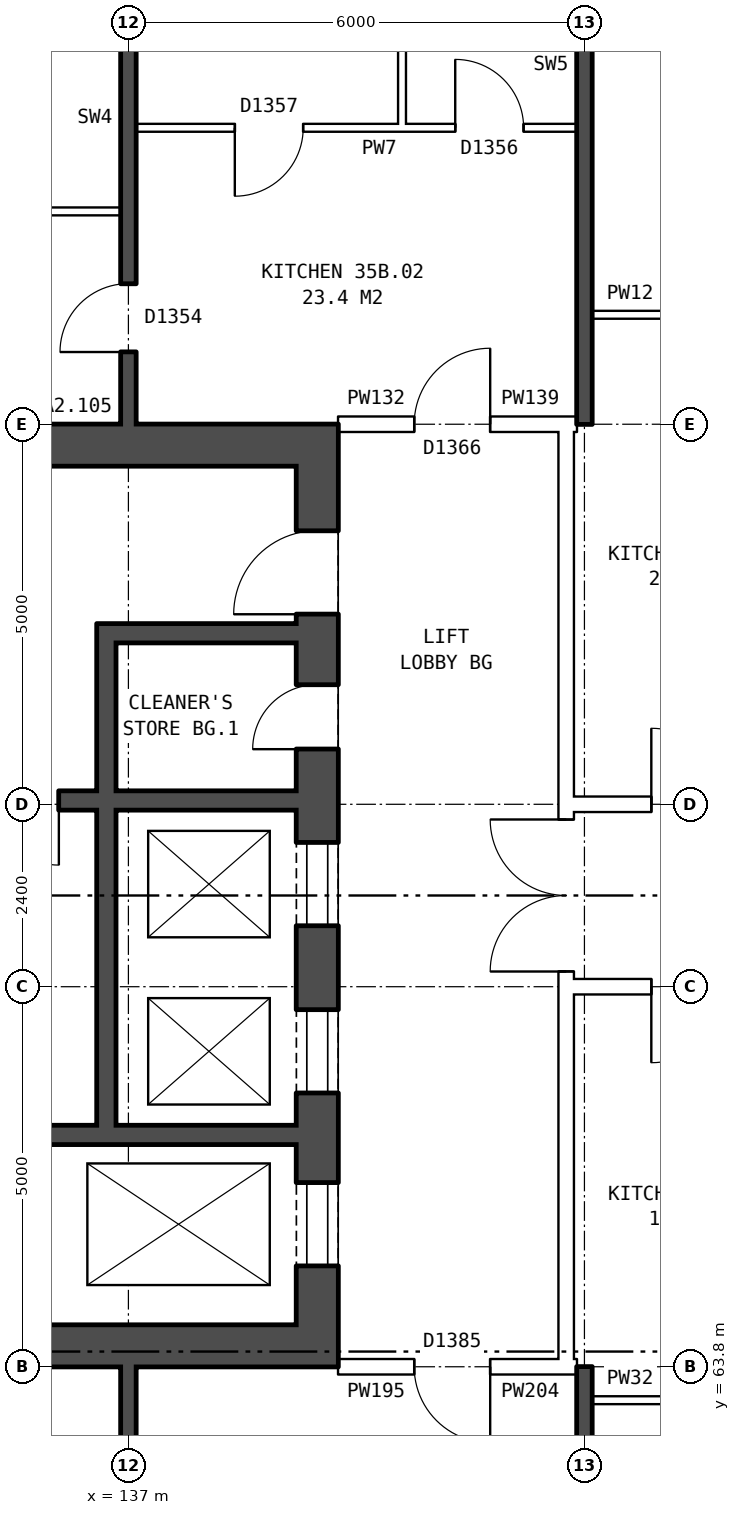
"""IFC4 building model, lengths in metres.
Left out: names, types, materials, properties, quantities, classifications, styles, units other than length and angle.
Written with IfcOpenShell. Run it as: python <this file> out.ifc"""

import sys

from ifc_helpers import new_model, si_unit, direction, frame, frame_2d, origin, place, context, subcontext, project, spatial, rectangle, extrude, element, fill, save


model = new_model("IFC4")
c1 = context("Model", 3, precision=1e-05, world=origin(), true_north=direction((0.0, 1.0)))
c2 = subcontext(c1, "Body", "Model", "MODEL_VIEW")
j1 = project(units=[si_unit("LENGTHUNIT", "METRE"), si_unit("PLANEANGLEUNIT", "RADIAN")], contexts=[c1])
p1 = place(None, origin())
s1 = spatial("IfcSite", under=j1, at=p1, CompositionType="ELEMENT")
p2 = place(p1, origin())
s2 = spatial("IfcBuilding", under=s1, at=p2, CompositionType="ELEMENT")
p3 = place(p2, frame((0.0, 0.0, 126.8)))
s3 = spatial("IfcBuildingStorey", under=s2, at=p3, CompositionType="ELEMENT", Elevation=126.8)
p4 = place(p3, frame((139.485, 63.8, 0.0), z_axis=(0.0, 0.0, 1.0), x_axis=(0.0, 1.0, 0.0)))
e1 = element("IfcWall", 1, at=p4, inside=s3, PredefinedType="SHEAR", context=c2, shape_type="SweptSolid", body=[
    extrude(rectangle(XDim=12.4, YDim=0.55, at=frame_2d((6.2, 0.0))), origin(), (0.0, 0.0, 1.0), 2.85),
])
p5 = place(p4, frame((1.325, 0.0, 0.0)))
e2 = element("IfcOpeningElement", 2, at=p5, cuts=e1, PredefinedType="OPENING", context=c2, shape_type="SweptSolid", body=[
    extrude(rectangle(XDim=1.1, YDim=2.1, at=frame_2d((0.55, 1.05))), frame((0.0, 0.285, 0.0), z_axis=(0.0, -1.0, 0.0), x_axis=(1.0, 0.0, 0.0)), (0.0, 0.0, 1.0), 0.57),
])
p6 = place(p4, frame((3.6, 0.0, 0.0)))
e3 = element("IfcOpeningElement", 3, at=p6, cuts=e1, PredefinedType="OPENING", context=c2, shape_type="SweptSolid", body=[
    extrude(rectangle(XDim=1.1, YDim=2.1, at=frame_2d((0.55, 1.05))), frame((0.0, 0.285, 0.0), z_axis=(0.0, -1.0, 0.0), x_axis=(1.0, 0.0, 0.0)), (0.0, 0.0, 1.0), 0.57),
])
p7 = place(p4, frame((5.8, 0.0, 0.0)))
e4 = element("IfcOpeningElement", 4, at=p7, cuts=e1, PredefinedType="OPENING", context=c2, shape_type="SweptSolid", body=[
    extrude(rectangle(XDim=1.1, YDim=2.1, at=frame_2d((0.55, 1.05))), frame((0.0, 0.285, 0.0), z_axis=(0.0, -1.0, 0.0), x_axis=(1.0, 0.0, 0.0)), (0.0, 0.0, 1.0), 0.57),
])
p8 = place(p4, frame((9.9, 0.0, 0.0)))
e5 = element("IfcOpeningElement", 5, at=p8, cuts=e1, PredefinedType="OPENING", context=c2, shape_type="SweptSolid", body=[
    extrude(rectangle(XDim=1.1, YDim=2.1, at=frame_2d((0.55, 1.05))), frame((0.0, 0.285, 0.0), z_axis=(0.0, -1.0, 0.0), x_axis=(1.0, 0.0, 0.0)), (0.0, 0.0, 1.0), 0.57),
])
p9 = place(p4, frame((8.125, 0.0, 0.0)))
e6 = element("IfcOpeningElement", 6, at=p9, cuts=e1, PredefinedType="OPENING", context=c2, shape_type="SweptSolid", body=[
    extrude(rectangle(XDim=0.85, YDim=2.1, at=frame_2d((0.425, 1.05))), frame((0.0, 0.285, 0.0), z_axis=(0.0, -1.0, 0.0), x_axis=(1.0, 0.0, 0.0)), (0.0, 0.0, 1.0), 0.57),
])
for number, where, z_axis, x_axis in (
    (7, (139.21, 64.075, 0.0), (0.0, 0.0, 1.0), (-1.0, 0.0, 0.0)),
    (8, (139.21, 75.925, 0.0), (0.0, 0.0, 1.0), (-1.0, 0.0, 0.0)),
):
    element("IfcWall", number, at=place(p3, frame(where, z_axis=z_axis, x_axis=x_axis)), inside=s3, PredefinedType="SHEAR", context=c2, shape_type="SweptSolid", body=[
        extrude(rectangle(XDim=7.3, YDim=0.55, at=frame_2d((3.65, 0.0))), origin(), (0.0, 0.0, 1.0), 2.85),
    ])
p10 = place(p3, frame((139.21, 66.85, 0.0), z_axis=(0.0, 0.0, 1.0), x_axis=(-1.0, 0.0, 0.0)))
e9 = element("IfcWall", 9, at=p10, inside=s3, PredefinedType="SHEAR", context=c2, shape_type="SweptSolid", body=[
    extrude(rectangle(XDim=4.475, YDim=0.25, at=frame_2d((2.237, 0.0))), origin(), (0.0, 0.0, 1.0), 2.85),
])
p11 = place(p3, frame((139.21, 71.25, 0.0), z_axis=(0.0, 0.0, 1.0), x_axis=(-1.0, 0.0, 0.0)))
e10 = element("IfcWall", 10, at=p11, inside=s3, PredefinedType="SHEAR", context=c2, shape_type="SweptSolid", body=[
    extrude(rectangle(XDim=7.3, YDim=0.25, at=frame_2d((3.65, 0.0))), origin(), (0.0, 0.0, 1.0), 2.85),
])
p12 = place(p11, frame((4.875, 0.0, 0.0)))
e11 = element("IfcOpeningElement", 11, at=p12, cuts=e10, PredefinedType="OPENING", context=c2, shape_type="SweptSolid", body=[
    extrude(rectangle(XDim=1.1, YDim=2.1, at=frame_2d((0.55, 1.05))), frame((0.0, 0.135, 0.0), z_axis=(0.0, -1.0, 0.0), x_axis=(1.0, 0.0, 0.0)), (0.0, 0.0, 1.0), 0.27),
])
p13 = place(p11, frame((3.125, 0.0, 0.0)))
e12 = element("IfcOpeningElement", 12, at=p13, cuts=e10, PredefinedType="OPENING", context=c2, shape_type="SweptSolid", body=[
    extrude(rectangle(XDim=0.85, YDim=2.1, at=frame_2d((0.425, 1.05))), frame((0.0, 0.135, 0.0), z_axis=(0.0, -1.0, 0.0), x_axis=(1.0, 0.0, 0.0)), (0.0, 0.0, 1.0), 0.27),
])
p14 = place(p3, frame((139.21, 73.45, 0.0), z_axis=(0.0, 0.0, 1.0), x_axis=(-1.0, 0.0, 0.0)))
e13 = element("IfcWall", 13, at=p14, inside=s3, PredefinedType="SHEAR", context=c2, shape_type="SweptSolid", body=[
    extrude(rectangle(XDim=2.375, YDim=0.25, at=frame_2d((1.188, 0.0))), origin(), (0.0, 0.0, 1.0), 2.85),
])
p15 = place(p3, frame((136.71, 66.975, 0.0), z_axis=(0.0, 0.0, 1.0), x_axis=(0.0, 1.0, 0.0)))
e14 = element("IfcWall", 14, at=p15, inside=s3, PredefinedType="SHEAR", context=c2, shape_type="SweptSolid", body=[
    extrude(rectangle(XDim=4.15, YDim=0.25, at=frame_2d((2.075, 0.0))), origin(), (0.0, 0.0, 1.0), 2.85),
])
p16 = place(p3, frame((136.71, 71.375, 0.0), z_axis=(0.0, 0.0, 1.0), x_axis=(0.0, 1.0, 0.0)))
e15 = element("IfcWall", 15, at=p16, inside=s3, PredefinedType="SHEAR", context=c2, shape_type="SweptSolid", body=[
    extrude(rectangle(XDim=2.2, YDim=0.25, at=frame_2d((1.1, 0.0))), origin(), (0.0, 0.0, 1.0), 2.85),
])
p17 = place(p3, frame((142.76, 63.9, 0.0), z_axis=(0.0, 0.0, 1.0), x_axis=(0.0, 1.0, 0.0)))
e16 = element("IfcWall", 16, at=p17, inside=s3, PredefinedType="PARTITIONING", context=c2, shape_type="SweptSolid", body=[
    extrude(rectangle(XDim=12.2, YDim=0.2, at=frame_2d((6.1, 0.0))), origin(), (0.0, 0.0, 1.0), 2.85),
])
p18 = place(p17, frame((5.1, 0.0, 0.0)))
e17 = element("IfcOpeningElement", 17, at=p18, cuts=e16, PredefinedType="OPENING", context=c2, shape_type="SweptSolid", body=[
    extrude(rectangle(XDim=2.0, YDim=2.1, at=frame_2d((1.0, 1.05))), frame((0.0, 0.11, 0.0), z_axis=(0.0, -1.0, 0.0), x_axis=(1.0, 0.0, 0.0)), (0.0, 0.0, 1.0), 0.22),
])
p19 = place(p3, frame((143.1, 63.36, 0.0), z_axis=(0.0, 0.0, 1.0), x_axis=(1.0, 0.0, 0.0)))
e18 = element("IfcWall", 18, at=p19, inside=s3, PredefinedType="PARTITIONING", context=c2, shape_type="SweptSolid", body=[
    extrude(rectangle(XDim=2.9, YDim=0.1, at=frame_2d((1.45, 0.0))), origin(), (0.0, 0.0, 1.0), 2.85),
])
p20 = place(p19, frame((1.0, 0.0, 0.0)))
e19 = element("IfcOpeningElement", 19, at=p20, cuts=e18, PredefinedType="OPENING", context=c2, shape_type="SweptSolid", body=[
    extrude(rectangle(XDim=0.9, YDim=2.1, at=frame_2d((0.45, 1.05))), frame((0.0, 0.06, 0.0), z_axis=(0.0, -1.0, 0.0), x_axis=(1.0, 0.0, 0.0)), (0.0, 0.0, 1.0), 0.12),
])
p21 = place(p3, frame((139.76, 63.8, 0.0), z_axis=(0.0, 0.0, 1.0), x_axis=(1.0, 0.0, 0.0)))
e20 = element("IfcWall", 20, at=p21, inside=s3, PredefinedType="PARTITIONING", context=c2, shape_type="SweptSolid", body=[
    extrude(rectangle(XDim=3.0, YDim=0.2, at=frame_2d((1.5, 0.0))), origin(), (0.0, 0.0, 1.0), 2.85),
])
p22 = place(p21, frame((1.0, 0.0, 0.0)))
e21 = element("IfcOpeningElement", 21, at=p22, cuts=e20, PredefinedType="OPENING", context=c2, shape_type="SweptSolid", body=[
    extrude(rectangle(XDim=1.0, YDim=2.1, at=frame_2d((0.5, 1.05))), frame((0.0, 0.11, 0.0), z_axis=(0.0, -1.0, 0.0), x_axis=(1.0, 0.0, 0.0)), (0.0, 0.0, 1.0), 0.22),
])
p23 = place(p3, frame((142.76, 63.8, 0.0), z_axis=(0.0, 0.0, 1.0), x_axis=(1.0, 0.0, 0.0)))
e22 = element("IfcWall", 22, at=p23, inside=s3, PredefinedType="PARTITIONING", context=c2, shape_type="SweptSolid", body=[
    extrude(rectangle(XDim=0.14, YDim=0.2, at=frame_2d((0.07, 0.0))), origin(), (0.0, 0.0, 1.0), 2.85),
])
p24 = place(p3, frame((142.76, 68.8, 0.0), z_axis=(0.0, 0.0, 1.0), x_axis=(1.0, 0.0, 0.0)))
e23 = element("IfcWall", 23, at=p24, inside=s3, PredefinedType="PARTITIONING", context=c2, shape_type="SweptSolid", body=[
    extrude(rectangle(XDim=14.48, YDim=0.2, at=frame_2d((7.24, 0.0))), origin(), (0.0, 0.0, 1.0), 2.85),
])
p25 = place(p24, frame((1.12, 0.0, 0.0)))
e24 = element("IfcOpeningElement", 24, at=p25, cuts=e23, PredefinedType="OPENING", context=c2, shape_type="SweptSolid", body=[
    extrude(rectangle(XDim=1.0, YDim=2.1, at=frame_2d((0.5, 1.05))), frame((0.0, 0.11, 0.0), z_axis=(0.0, -1.0, 0.0), x_axis=(1.0, 0.0, 0.0)), (0.0, 0.0, 1.0), 0.22),
])
p26 = place(p24, frame((7.24, 0.0, 0.0)))
e25 = element("IfcOpeningElement", 25, at=p26, cuts=e23, PredefinedType="OPENING", context=c2, shape_type="SweptSolid", body=[
    extrude(rectangle(XDim=1.0, YDim=2.1, at=frame_2d((0.5, 1.05))), frame((0.0, 0.11, 0.0), z_axis=(0.0, -1.0, 0.0), x_axis=(1.0, 0.0, 0.0)), (0.0, 0.0, 1.0), 0.22),
])
p27 = place(p3, frame((142.76, 71.2, 0.0), z_axis=(0.0, 0.0, 1.0), x_axis=(1.0, 0.0, 0.0)))
e26 = element("IfcWall", 26, at=p27, inside=s3, PredefinedType="PARTITIONING", context=c2, shape_type="SweptSolid", body=[
    extrude(rectangle(XDim=14.48, YDim=0.2, at=frame_2d((7.24, 0.0))), origin(), (0.0, 0.0, 1.0), 2.85),
])
p28 = place(p27, frame((1.12, 0.0, 0.0)))
e27 = element("IfcOpeningElement", 27, at=p28, cuts=e26, PredefinedType="OPENING", context=c2, shape_type="SweptSolid", body=[
    extrude(rectangle(XDim=1.0, YDim=2.1, at=frame_2d((0.5, 1.05))), frame((0.0, 0.11, 0.0), z_axis=(0.0, -1.0, 0.0), x_axis=(1.0, 0.0, 0.0)), (0.0, 0.0, 1.0), 0.22),
])
p29 = place(p27, frame((10.24, 0.0, 0.0)))
e28 = element("IfcOpeningElement", 28, at=p29, cuts=e26, PredefinedType="OPENING", context=c2, shape_type="SweptSolid", body=[
    extrude(rectangle(XDim=1.0, YDim=2.1, at=frame_2d((0.5, 1.05))), frame((0.0, 0.11, 0.0), z_axis=(0.0, -1.0, 0.0), x_axis=(1.0, 0.0, 0.0)), (0.0, 0.0, 1.0), 0.22),
])
p30 = place(p3, frame((139.76, 76.2, 0.0), z_axis=(0.0, 0.0, 1.0), x_axis=(1.0, 0.0, 0.0)))
e29 = element("IfcWall", 29, at=p30, inside=s3, PredefinedType="PARTITIONING", context=c2, shape_type="SweptSolid", body=[
    extrude(rectangle(XDim=3.0, YDim=0.2, at=frame_2d((1.5, 0.0))), origin(), (0.0, 0.0, 1.0), 2.85),
])
p31 = place(p30, frame((1.0, 0.0, 0.0)))
e30 = element("IfcOpeningElement", 30, at=p31, cuts=e29, PredefinedType="OPENING", context=c2, shape_type="SweptSolid", body=[
    extrude(rectangle(XDim=1.0, YDim=2.1, at=frame_2d((0.5, 1.05))), frame((0.0, 0.11, 0.0), z_axis=(0.0, -1.0, 0.0), x_axis=(1.0, 0.0, 0.0)), (0.0, 0.0, 1.0), 0.22),
])
p32 = place(p3, frame((142.76, 76.2, 0.0), z_axis=(0.0, 0.0, 1.0), x_axis=(1.0, 0.0, 0.0)))
e31 = element("IfcWall", 31, at=p32, inside=s3, PredefinedType="PARTITIONING", context=c2, shape_type="SweptSolid", body=[
    extrude(rectangle(XDim=0.14, YDim=0.2, at=frame_2d((0.07, 0.0))), origin(), (0.0, 0.0, 1.0), 2.85),
])
p33 = place(p3, frame((143.1, 77.64, 0.0), z_axis=(0.0, 0.0, 1.0), x_axis=(1.0, 0.0, 0.0)))
e32 = element("IfcWall", 32, at=p33, inside=s3, PredefinedType="PARTITIONING", context=c2, shape_type="SweptSolid", body=[
    extrude(rectangle(XDim=2.9, YDim=0.1, at=frame_2d((1.45, 0.0))), origin(), (0.0, 0.0, 1.0), 2.85),
])
p34 = place(p33, frame((1.0, 0.0, 0.0)))
e33 = element("IfcOpeningElement", 33, at=p34, cuts=e32, PredefinedType="OPENING", context=c2, shape_type="SweptSolid", body=[
    extrude(rectangle(XDim=0.9, YDim=2.1, at=frame_2d((0.45, 1.05))), frame((0.0, 0.06, 0.0), z_axis=(0.0, -1.0, 0.0), x_axis=(1.0, 0.0, 0.0)), (0.0, 0.0, 1.0), 0.12),
])
p35 = place(p3, frame((131.36, 79.0, 0.0), z_axis=(0.0, 0.0, 1.0), x_axis=(1.0, 0.0, 0.0)))
e34 = element("IfcWall", 34, at=p35, inside=s3, PredefinedType="PARTITIONING", context=c2, shape_type="SweptSolid", body=[
    extrude(rectangle(XDim=5.54, YDim=0.1, at=frame_2d((2.77, 0.0))), origin(), (0.0, 0.0, 1.0), 2.85),
])
p36 = place(p3, frame((137.1, 80.1, 0.0), z_axis=(0.0, 0.0, 1.0), x_axis=(1.0, 0.0, 0.0)))
e35 = element("IfcWall", 35, at=p36, inside=s3, PredefinedType="PARTITIONING", context=c2, shape_type="SweptSolid", body=[
    extrude(rectangle(XDim=5.8, YDim=0.1, at=frame_2d((2.9, 0.0))), origin(), (0.0, 0.0, 1.0), 2.85),
])
p37 = place(p36, frame((1.3, 0.0, 0.0)))
e36 = element("IfcOpeningElement", 36, at=p37, cuts=e35, PredefinedType="OPENING", context=c2, shape_type="SweptSolid", body=[
    extrude(rectangle(XDim=0.9, YDim=2.1, at=frame_2d((0.45, 1.05))), frame((0.0, 0.06, 0.0), z_axis=(0.0, -1.0, 0.0), x_axis=(1.0, 0.0, 0.0)), (0.0, 0.0, 1.0), 0.12),
])
p38 = place(p36, frame((4.2, 0.0, 0.0)))
e37 = element("IfcOpeningElement", 37, at=p38, cuts=e35, PredefinedType="OPENING", context=c2, shape_type="SweptSolid", body=[
    extrude(rectangle(XDim=0.9, YDim=2.1, at=frame_2d((0.45, 1.05))), frame((0.0, 0.06, 0.0), z_axis=(0.0, -1.0, 0.0), x_axis=(1.0, 0.0, 0.0)), (0.0, 0.0, 1.0), 0.12),
])
p39 = place(p3, frame((137.0, 54.36, 0.0), z_axis=(0.0, 0.0, 1.0), x_axis=(0.0, 1.0, 0.0)))
e38 = element("IfcWall", 38, at=p39, inside=s3, PredefinedType="SOLIDWALL", context=c2, shape_type="SweptSolid", body=[
    extrude(rectangle(XDim=9.44, YDim=0.2, at=frame_2d((4.72, 0.0))), origin(), (0.0, 0.0, 1.0), 2.85),
])
p40 = place(p39, frame((2.32, 0.0, 0.0)))
e39 = element("IfcOpeningElement", 39, at=p40, cuts=e38, PredefinedType="OPENING", context=c2, shape_type="SweptSolid", body=[
    extrude(rectangle(XDim=0.9, YDim=2.1, at=frame_2d((0.45, 1.05))), frame((0.0, 0.11, 0.0), z_axis=(0.0, -1.0, 0.0), x_axis=(1.0, 0.0, 0.0)), (0.0, 0.0, 1.0), 0.22),
])
p41 = place(p39, frame((7.59, 0.0, 0.0)))
e40 = element("IfcOpeningElement", 40, at=p41, cuts=e38, PredefinedType="OPENING", context=c2, shape_type="SweptSolid", body=[
    extrude(rectangle(XDim=0.9, YDim=2.1, at=frame_2d((0.45, 1.05))), frame((0.0, 0.11, 0.0), z_axis=(0.0, -1.0, 0.0), x_axis=(1.0, 0.0, 0.0)), (0.0, 0.0, 1.0), 0.22),
])
p42 = place(p3, frame((137.0, 76.2, 0.0), z_axis=(0.0, 0.0, 1.0), x_axis=(0.0, 1.0, 0.0)))
e41 = element("IfcWall", 41, at=p42, inside=s3, PredefinedType="SOLIDWALL", context=c2, shape_type="SweptSolid", body=[
    extrude(rectangle(XDim=9.44, YDim=0.2, at=frame_2d((4.72, 0.0))), origin(), (0.0, 0.0, 1.0), 2.85),
])
p43 = place(p42, frame((6.22, 0.0, 0.0)))
e42 = element("IfcOpeningElement", 42, at=p43, cuts=e41, PredefinedType="OPENING", context=c2, shape_type="SweptSolid", body=[
    extrude(rectangle(XDim=0.9, YDim=2.1, at=frame_2d((0.45, 1.05))), frame((0.0, 0.11, 0.0), z_axis=(0.0, -1.0, 0.0), x_axis=(1.0, 0.0, 0.0)), (0.0, 0.0, 1.0), 0.22),
])
p44 = place(p42, frame((0.95, 0.0, 0.0)))
e43 = element("IfcOpeningElement", 43, at=p44, cuts=e41, PredefinedType="OPENING", context=c2, shape_type="SweptSolid", body=[
    extrude(rectangle(XDim=0.9, YDim=2.1, at=frame_2d((0.45, 1.05))), frame((0.0, 0.11, 0.0), z_axis=(0.0, -1.0, 0.0), x_axis=(1.0, 0.0, 0.0)), (0.0, 0.0, 1.0), 0.22),
])
p45 = place(p3, frame((140.6, 80.15, 0.0), z_axis=(0.0, 0.0, 1.0), x_axis=(0.0, 1.0, 0.0)))
e44 = element("IfcWall", 44, at=p45, inside=s3, PredefinedType="PARTITIONING", context=c2, shape_type="SweptSolid", body=[
    extrude(rectangle(XDim=2.4, YDim=0.1, at=frame_2d((1.2, 0.0))), origin(), (0.0, 0.0, 1.0), 2.85),
])
for number, where, z_axis, x_axis in (
    (45, (143.0, 54.36, 0.0), (0.0, 0.0, 1.0), (0.0, 1.0, 0.0)),
    (46, (143.0, 76.2, 0.0), (0.0, 0.0, 1.0), (0.0, 1.0, 0.0)),
):
    element("IfcWall", number, at=place(p3, frame(where, z_axis=z_axis, x_axis=x_axis)), inside=s3, PredefinedType="SOLIDWALL", context=c2, shape_type="SweptSolid", body=[
        extrude(rectangle(XDim=9.44, YDim=0.2, at=frame_2d((4.72, 0.0))), origin(), (0.0, 0.0, 1.0), 2.85),
    ])
p46 = place(p5, origin())
e47 = element("IfcDoor", 47, at=p46, inside=s3, OperationType="DOUBLE_DOOR_SLIDING", PredefinedType="DOOR", context=c2, shape_type="SweptSolid", body=[
    extrude(rectangle(XDim=1.1, YDim=2.1, at=frame_2d((0.55, 1.05))), frame((0.0, 0.26, 0.0), z_axis=(0.0, -1.0, 0.0), x_axis=(1.0, 0.0, 0.0)), (0.0, 0.0, 1.0), 0.05),
])
fill(e2, e47)
p47 = place(p6, origin())
e48 = element("IfcDoor", 48, at=p47, inside=s3, OperationType="DOUBLE_DOOR_SLIDING", PredefinedType="DOOR", context=c2, shape_type="SweptSolid", body=[
    extrude(rectangle(XDim=1.1, YDim=2.1, at=frame_2d((0.55, 1.05))), frame((0.0, 0.26, 0.0), z_axis=(0.0, -1.0, 0.0), x_axis=(1.0, 0.0, 0.0)), (0.0, 0.0, 1.0), 0.05),
])
fill(e3, e48)
p48 = place(p7, origin())
e49 = element("IfcDoor", 49, at=p48, inside=s3, OperationType="DOUBLE_DOOR_SLIDING", PredefinedType="DOOR", context=c2, shape_type="SweptSolid", body=[
    extrude(rectangle(XDim=1.1, YDim=2.1, at=frame_2d((0.55, 1.05))), frame((0.0, 0.26, 0.0), z_axis=(0.0, -1.0, 0.0), x_axis=(1.0, 0.0, 0.0)), (0.0, 0.0, 1.0), 0.05),
])
fill(e4, e49)
p49 = place(p8, origin())
e50 = element("IfcDoor", 50, at=p49, inside=s3, OperationType="SINGLE_SWING_LEFT", PredefinedType="DOOR", context=c2, shape_type="SweptSolid", body=[
    extrude(rectangle(XDim=1.1, YDim=2.1, at=frame_2d((0.55, 1.05))), frame((0.0, 0.26, 0.0), z_axis=(0.0, -1.0, 0.0), x_axis=(1.0, 0.0, 0.0)), (0.0, 0.0, 1.0), 0.05),
])
fill(e5, e50)
p50 = place(p9, origin())
e51 = element("IfcDoor", 51, at=p50, inside=s3, OperationType="SINGLE_SWING_LEFT", PredefinedType="DOOR", context=c2, shape_type="SweptSolid", body=[
    extrude(rectangle(XDim=0.85, YDim=2.1, at=frame_2d((0.425, 1.05))), frame((0.0, 0.26, 0.0), z_axis=(0.0, -1.0, 0.0), x_axis=(1.0, 0.0, 0.0)), (0.0, 0.0, 1.0), 0.05),
])
fill(e6, e51)
p51 = place(p13, origin())
e52 = element("IfcDoor", 52, at=p51, inside=s3, OperationType="SINGLE_SWING_LEFT", PredefinedType="DOOR", context=c2, shape_type="SweptSolid", body=[
    extrude(rectangle(XDim=0.85, YDim=2.1, at=frame_2d((0.425, 1.05))), frame((0.0, 0.025, 0.0), z_axis=(0.0, -1.0, 0.0), x_axis=(1.0, 0.0, 0.0)), (0.0, 0.0, 1.0), 0.05),
])
fill(e12, e52)
p52 = place(p18, origin())
e53 = element("IfcDoor", 53, at=p52, inside=s3, OperationType="DOUBLE_DOOR_SINGLE_SWING", PredefinedType="DOOR", context=c2, shape_type="SweptSolid", body=[
    extrude(rectangle(XDim=2.0, YDim=2.1, at=frame_2d((1.0, 1.05))), frame((0.0, 0.025, 0.0), z_axis=(0.0, -1.0, 0.0), x_axis=(1.0, 0.0, 0.0)), (0.0, 0.0, 1.0), 0.05),
])
fill(e17, e53)
p53 = place(p22, frame((1.0, 0.0, 0.0), z_axis=(0.0, 0.0, 1.0), x_axis=(-1.0, 0.0, 0.0)))
e54 = element("IfcDoor", 54, at=p53, inside=s3, OperationType="SINGLE_SWING_LEFT", PredefinedType="DOOR", context=c2, shape_type="SweptSolid", body=[
    extrude(rectangle(XDim=1.0, YDim=2.1, at=frame_2d((0.5, 1.05))), frame((0.0, 0.025, 0.0), z_axis=(0.0, -1.0, 0.0), x_axis=(1.0, 0.0, 0.0)), (0.0, 0.0, 1.0), 0.05),
])
fill(e21, e54)
p54 = place(p44, origin())
e55 = element("IfcDoor", 55, at=p54, inside=s3, OperationType="SINGLE_SWING_LEFT", PredefinedType="DOOR", context=c2, shape_type="SweptSolid", body=[
    extrude(rectangle(XDim=0.9, YDim=2.1, at=frame_2d((0.45, 1.05))), frame((0.0, 0.025, 0.0), z_axis=(0.0, -1.0, 0.0), x_axis=(1.0, 0.0, 0.0)), (0.0, 0.0, 1.0), 0.05),
])
fill(e43, e55)
p55 = place(p31, origin())
e56 = element("IfcDoor", 56, at=p55, inside=s3, OperationType="SINGLE_SWING_RIGHT", PredefinedType="DOOR", context=c2, shape_type="SweptSolid", body=[
    extrude(rectangle(XDim=1.0, YDim=2.1, at=frame_2d((0.5, 1.05))), frame((0.0, 0.025, 0.0), z_axis=(0.0, -1.0, 0.0), x_axis=(1.0, 0.0, 0.0)), (0.0, 0.0, 1.0), 0.05),
])
fill(e30, e56)
p56 = place(p37, frame((0.9, 0.0, 0.0), z_axis=(0.0, 0.0, 1.0), x_axis=(-1.0, 0.0, 0.0)))
e57 = element("IfcDoor", 57, at=p56, inside=s3, OperationType="SINGLE_SWING_RIGHT", PredefinedType="DOOR", context=c2, shape_type="SweptSolid", body=[
    extrude(rectangle(XDim=0.9, YDim=2.1, at=frame_2d((0.45, 1.05))), frame((0.0, 0.025, 0.0), z_axis=(0.0, -1.0, 0.0), x_axis=(1.0, 0.0, 0.0)), (0.0, 0.0, 1.0), 0.05),
])
fill(e36, e57)
p57 = place(p38, origin())
e58 = element("IfcDoor", 58, at=p57, inside=s3, OperationType="SINGLE_SWING_LEFT", PredefinedType="DOOR", context=c2, shape_type="SweptSolid", body=[
    extrude(rectangle(XDim=0.9, YDim=2.1, at=frame_2d((0.45, 1.05))), frame((0.0, 0.025, 0.0), z_axis=(0.0, -1.0, 0.0), x_axis=(1.0, 0.0, 0.0)), (0.0, 0.0, 1.0), 0.05),
])
fill(e37, e58)
p58 = place(p25, frame((1.0, 0.0, 0.0), z_axis=(0.0, 0.0, 1.0), x_axis=(-1.0, 0.0, 0.0)))
e59 = element("IfcDoor", 59, at=p58, inside=s3, OperationType="SINGLE_SWING_RIGHT", PredefinedType="DOOR", context=c2, shape_type="SweptSolid", body=[
    extrude(rectangle(XDim=1.0, YDim=2.1, at=frame_2d((0.5, 1.05))), frame((0.0, 0.025, 0.0), z_axis=(0.0, -1.0, 0.0), x_axis=(1.0, 0.0, 0.0)), (0.0, 0.0, 1.0), 0.05),
])
fill(e24, e59)
p59 = place(p28, origin())
e60 = element("IfcDoor", 60, at=p59, inside=s3, OperationType="SINGLE_SWING_LEFT", PredefinedType="DOOR", context=c2, shape_type="SweptSolid", body=[
    extrude(rectangle(XDim=1.0, YDim=2.1, at=frame_2d((0.5, 1.05))), frame((0.0, 0.025, 0.0), z_axis=(0.0, -1.0, 0.0), x_axis=(1.0, 0.0, 0.0)), (0.0, 0.0, 1.0), 0.05),
])
fill(e27, e60)
save(model, sys.argv[1])
